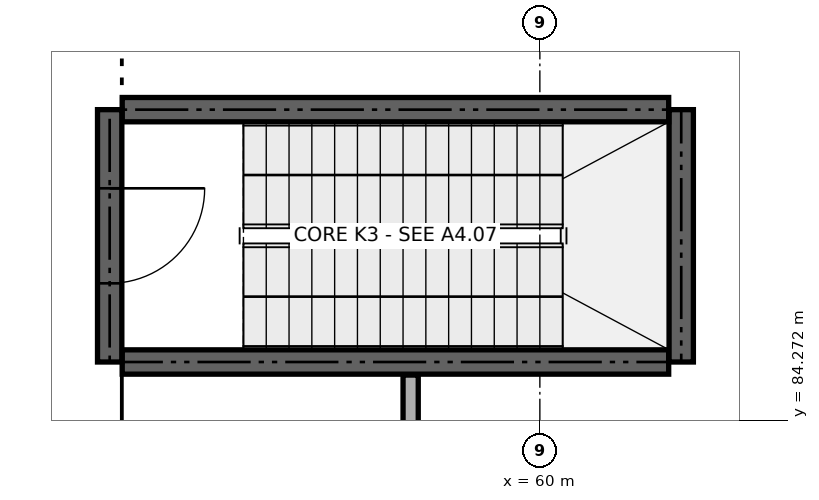
"""IFC4 building model, lengths in metres.
Left out: names, types, materials, properties, quantities, classifications, styles, units other than length and angle.
Written with IfcOpenShell. Run it as: python <this file> out.ifc"""

import sys

from ifc_helpers import new_model, si_unit, direction, frame, frame_2d, origin, place, context, subcontext, project, spatial, rectangle, extrude, element, fill, save


model = new_model("IFC4")
c1 = context("Model", 3, precision=1e-05, world=origin(), true_north=direction((0.0, 1.0)))
c2 = subcontext(c1, "Body", "Model", "MODEL_VIEW")
j1 = project(units=[si_unit("LENGTHUNIT", "METRE"), si_unit("PLANEANGLEUNIT", "RADIAN")], contexts=[c1])
p1 = place(None, origin())
s1 = spatial("IfcSite", under=j1, at=p1, CompositionType="ELEMENT")
p2 = place(p1, origin())
s2 = spatial("IfcBuilding", under=s1, at=p2, CompositionType="ELEMENT")
p3 = place(p2, origin())
s3 = spatial("IfcBuildingStorey", under=s2, at=p3, CompositionType="ELEMENT", Elevation=0.0)
p4 = place(p3, frame((54.505, 85.04, 0.0), z_axis=(0.0, 0.0, 1.0), x_axis=(1.0, 0.0, 0.0)))
e1 = element("IfcWall", 1, at=p4, inside=s3, PredefinedType="SHEAR", context=c2, shape_type="SweptSolid", body=[
    extrude(rectangle(XDim=7.19, YDim=0.32, at=frame_2d((3.595, 0.0))), origin(), (0.0, 0.0, 1.0), 4.7),
])
p5 = place(p3, frame((61.86, 85.04, 0.0), z_axis=(0.0, 0.0, 1.0), x_axis=(0.0, 1.0, 0.0)))
e2 = element("IfcWall", 2, at=p5, inside=s3, PredefinedType="SHEAR", context=c2, shape_type="SweptSolid", body=[
    extrude(rectangle(XDim=3.32, YDim=0.32, at=frame_2d((1.66, 0.0))), origin(), (0.0, 0.0, 1.0), 4.7),
])
p6 = place(p3, frame((61.695, 88.36, 0.0), z_axis=(0.0, 0.0, 1.0), x_axis=(-1.0, 0.0, 0.0)))
e3 = element("IfcWall", 3, at=p6, inside=s3, PredefinedType="SHEAR", context=c2, shape_type="SweptSolid", body=[
    extrude(rectangle(XDim=7.19, YDim=0.32, at=frame_2d((3.595, 0.0))), origin(), (0.0, 0.0, 1.0), 4.7),
])
p7 = place(p3, frame((54.34, 88.36, 0.0), z_axis=(0.0, 0.0, 1.0), x_axis=(0.0, -1.0, 0.0)))
e4 = element("IfcWall", 4, at=p7, inside=s3, PredefinedType="SHEAR", context=c2, shape_type="SweptSolid", body=[
    extrude(rectangle(XDim=3.32, YDim=0.32, at=frame_2d((1.66, 0.0))), origin(), (0.0, 0.0, 1.0), 4.7),
])
p8 = place(p7, frame((1.035, 0.0, 0.0)))
e5 = element("IfcOpeningElement", 5, at=p8, cuts=e4, PredefinedType="OPENING", context=c2, shape_type="SweptSolid", body=[
    extrude(rectangle(XDim=1.25, YDim=2.2, at=frame_2d((0.625, 1.1))), frame((0.0, 0.172, 0.0), z_axis=(0.0, -1.0, 0.0), x_axis=(1.0, 0.0, 0.0)), (0.0, 0.0, 1.0), 0.344),
])
p9 = place(p3, frame((58.3, 76.002, 0.0), z_axis=(0.0, 0.0, 1.0), x_axis=(0.0, 1.0, 0.0)))
e6 = element("IfcWall", 6, at=p9, inside=s3, PredefinedType="PARTITIONING", context=c2, shape_type="SweptSolid", body=[
    extrude(rectangle(XDim=8.866, YDim=0.2, at=frame_2d((4.433, 0.0))), origin(), (0.0, 0.0, 1.0), 4.035),
])
p10 = place(p9, frame((3.461, 0.0, 0.0)))
e7 = element("IfcOpeningElement", 7, at=p10, cuts=e6, PredefinedType="OPENING", context=c2, shape_type="SweptSolid", body=[
    extrude(rectangle(XDim=1.0, YDim=2.15, at=frame_2d((0.5, 1.075))), frame((0.0, 0.112, 0.0), z_axis=(0.0, -1.0, 0.0), x_axis=(1.0, 0.0, 0.0)), (0.0, 0.0, 1.0), 0.224),
])
p11 = place(p8, origin())
e8 = element("IfcDoor", 8, at=p11, inside=s3, OperationType="SINGLE_SWING_LEFT", PredefinedType="DOOR", context=c2, shape_type="SweptSolid", body=[
    extrude(rectangle(XDim=1.25, YDim=2.2, at=frame_2d((0.625, 1.1))), frame((0.0, 0.025, 0.0), z_axis=(0.0, -1.0, 0.0), x_axis=(1.0, 0.0, 0.0)), (0.0, 0.0, 1.0), 0.05),
])
fill(e5, e8)
save(model, sys.argv[1])
